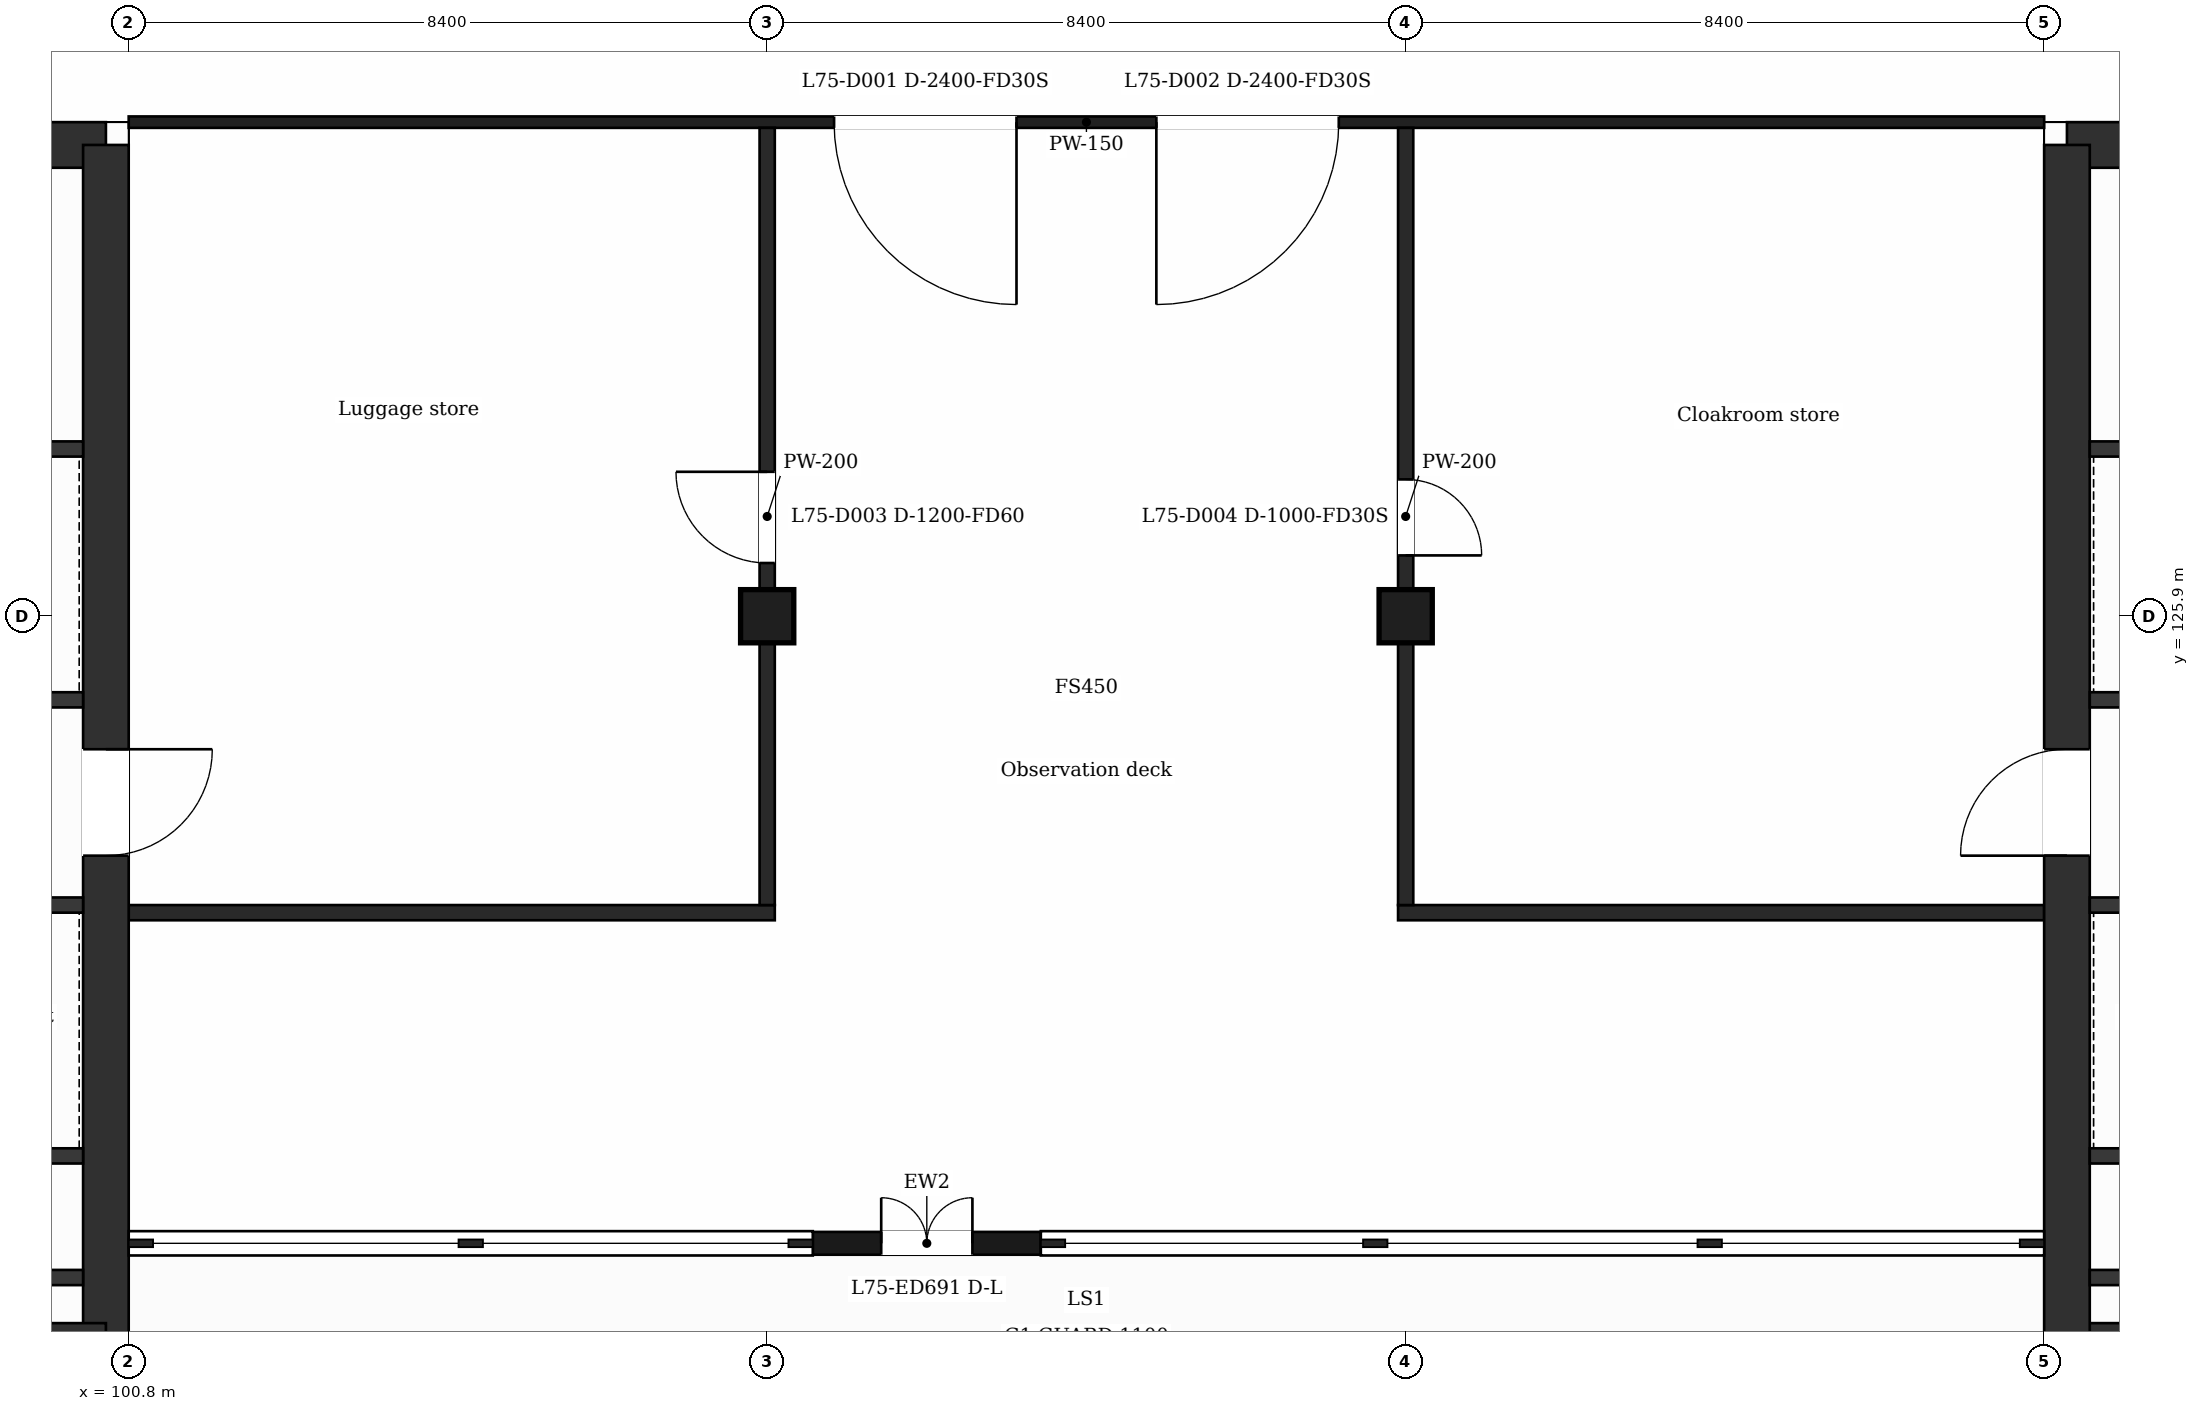
"""IFC4 building model, lengths in metres.
Left out: names, types, materials, properties, quantities, classifications, styles, units other than length and angle.
Written with IfcOpenShell. Run it as: python <this file> out.ifc"""

import sys

from ifc_helpers import new_model, si_unit, direction, frame, frame_2d, origin, origin_2d, place, context, subcontext, project, spatial, rectangle, extrude, element, fill, save


model = new_model("IFC4")
c1 = context("Model", 3, precision=1e-05, world=origin(), true_north=direction((0.0, 1.0)))
c2 = subcontext(c1, "Body", "Model", "MODEL_VIEW")
j1 = project(units=[si_unit("LENGTHUNIT", "METRE"), si_unit("PLANEANGLEUNIT", "RADIAN")], contexts=[c1])
p1 = place(None, origin())
s1 = spatial("IfcSite", under=j1, at=p1, CompositionType="ELEMENT")
p2 = place(p1, origin())
s2 = spatial("IfcBuilding", under=s1, at=p2, CompositionType="ELEMENT")
p3 = place(p2, frame((0.0, 0.0, 307.9)))
s3 = spatial("IfcBuildingStorey", under=s2, at=p3, CompositionType="ELEMENT", Elevation=307.9)
p4 = place(p3, frame((88.893, 132.1, 0.0), z_axis=(0.0, 0.0, 1.0), x_axis=(1.0, 0.0, 0.0)))
e1 = element("IfcWall", 1, at=p4, inside=s3, PredefinedType="SHEAR", context=c2, shape_type="SweptSolid", body=[
    extrude(rectangle(XDim=11.607, YDim=0.6, at=frame_2d((5.803, 0.0))), origin(), (0.0, 0.0, 1.0), 7.5),
])
p5 = place(p4, frame((7.021, 0.0, 0.0)))
e2 = element("IfcOpeningElement", 2, at=p5, cuts=e1, PredefinedType="OPENING", context=c2, shape_type="SweptSolid", body=[
    extrude(rectangle(XDim=1.2, YDim=2.1, at=frame_2d((0.6, 1.05))), frame((0.0, 0.31, 0.0), z_axis=(0.0, -1.0, 0.0), x_axis=(1.0, 0.0, 0.0)), (0.0, 0.0, 1.0), 0.62),
])
p6 = place(p3, frame((100.5, 132.1, 0.0), z_axis=(0.0, 0.0, 1.0), x_axis=(0.0, -1.0, 0.0)))
e3 = element("IfcWall", 3, at=p6, inside=s3, PredefinedType="SHEAR", context=c2, shape_type="SweptSolid", body=[
    extrude(rectangle(XDim=15.8, YDim=0.6, at=frame_2d((7.9, 0.0))), origin(), (0.0, 0.0, 1.0), 7.5),
])
p7 = place(p6, frame((7.95, 0.0, 0.0)))
e4 = element("IfcOpeningElement", 4, at=p7, cuts=e3, PredefinedType="OPENING", context=c2, shape_type="SweptSolid", body=[
    extrude(rectangle(XDim=1.4, YDim=2.1, at=frame_2d((0.7, 1.05))), frame((0.0, 0.31, 0.0), z_axis=(0.0, -1.0, 0.0), x_axis=(1.0, 0.0, 0.0)), (0.0, 0.0, 1.0), 0.62),
])
p8 = place(p3, frame((100.5, 116.3, 0.0), z_axis=(0.0, 0.0, 1.0), x_axis=(-1.0, 0.0, 0.0)))
e5 = element("IfcWall", 5, at=p8, inside=s3, PredefinedType="SHEAR", context=c2, shape_type="SweptSolid", body=[
    extrude(rectangle(XDim=13.734, YDim=0.6, at=frame_2d((6.867, 0.0))), origin(), (0.0, 0.0, 1.0), 7.5),
])
p9 = place(p3, frame((126.3, 132.1, 0.0), z_axis=(0.0, 0.0, 1.0), x_axis=(1.0, 0.0, 0.0)))
e6 = element("IfcWall", 6, at=p9, inside=s3, PredefinedType="SHEAR", context=c2, shape_type="SweptSolid", body=[
    extrude(rectangle(XDim=11.607, YDim=0.6, at=frame_2d((5.803, 0.0))), origin(), (0.0, 0.0, 1.0), 7.5),
])
p10 = place(p9, frame((3.386, 0.0, 0.0)))
e7 = element("IfcOpeningElement", 7, at=p10, cuts=e6, PredefinedType="OPENING", context=c2, shape_type="SweptSolid", body=[
    extrude(rectangle(XDim=1.2, YDim=2.1, at=frame_2d((0.6, 1.05))), frame((0.0, 0.31, 0.0), z_axis=(0.0, -1.0, 0.0), x_axis=(1.0, 0.0, 0.0)), (0.0, 0.0, 1.0), 0.62),
])
p11 = place(p3, frame((140.034, 116.3, 0.0), z_axis=(0.0, 0.0, 1.0), x_axis=(-1.0, 0.0, 0.0)))
e8 = element("IfcWall", 8, at=p11, inside=s3, PredefinedType="SHEAR", context=c2, shape_type="SweptSolid", body=[
    extrude(rectangle(XDim=13.734, YDim=0.6, at=frame_2d((6.867, 0.0))), origin(), (0.0, 0.0, 1.0), 7.5),
])
p12 = place(p3, frame((126.3, 116.3, 0.0), z_axis=(0.0, 0.0, 1.0), x_axis=(0.0, 1.0, 0.0)))
e9 = element("IfcWall", 9, at=p12, inside=s3, PredefinedType="SHEAR", context=c2, shape_type="SweptSolid", body=[
    extrude(rectangle(XDim=15.8, YDim=0.6, at=frame_2d((7.9, 0.0))), origin(), (0.0, 0.0, 1.0), 7.5),
])
p13 = place(p12, frame((6.45, 0.0, 0.0)))
e10 = element("IfcOpeningElement", 10, at=p13, cuts=e9, PredefinedType="OPENING", context=c2, shape_type="SweptSolid", body=[
    extrude(rectangle(XDim=1.4, YDim=2.1, at=frame_2d((0.7, 1.05))), frame((0.0, 0.31, 0.0), z_axis=(0.0, -1.0, 0.0), x_axis=(1.0, 0.0, 0.0)), (0.0, 0.0, 1.0), 0.62),
])
for number, where, z_axis, x_axis in (
    (11, (109.2, 125.9, 0.0), (0.0, 0.0, 1.0), (1.0, 0.0, 0.0)),
    (12, (117.6, 125.9, 0.0), (0.0, 0.0, 1.0), (1.0, 0.0, 0.0)),
):
    element("IfcColumn", number, at=place(p3, frame(where, z_axis=z_axis, x_axis=x_axis)), inside=s3, PredefinedType="COLUMN", context=c2, shape_type="SweptSolid", body=[
        extrude(rectangle(XDim=0.7, YDim=0.7, at=origin_2d()), origin(), (0.0, 0.0, 1.0), 7.5),
    ])
p14 = place(p3, frame((109.8, 117.65, 0.0), z_axis=(0.0, 0.0, 1.0), x_axis=(1.0, 0.0, 0.0)))
e13 = element("IfcWall", 13, at=p14, inside=s3, PredefinedType="SOLIDWALL", context=c2, shape_type="SweptSolid", body=[
    extrude(rectangle(XDim=3.0, YDim=0.3, at=frame_2d((1.5, 0.0))), origin(), (0.0, 0.0, 1.0), 7.05),
])
p15 = place(p14, frame((0.9, 0.0, 0.0)))
e14 = element("IfcOpeningElement", 14, at=p15, cuts=e13, PredefinedType="OPENING", context=c2, shape_type="SweptSolid", body=[
    extrude(rectangle(XDim=1.2, YDim=2.4, at=frame_2d((0.6, 1.2))), frame((0.0, 0.16, 0.0), z_axis=(0.0, -1.0, 0.0), x_axis=(1.0, 0.0, 0.0)), (0.0, 0.0, 1.0), 0.32),
])
for number, where, z_axis, x_axis in (
    (15, (95.227, 117.2, 0.0), (0.0, 0.0, 1.0), (1.0, 0.0, 0.0)),
    (16, (126.6, 117.2, 0.0), (0.0, 0.0, 1.0), (1.0, 0.0, 0.0)),
    (17, (95.227, 118.8, 0.0), (0.0, 0.0, 1.0), (1.0, 0.0, 0.0)),
    (18, (126.6, 118.8, 0.0), (0.0, 0.0, 1.0), (1.0, 0.0, 0.0)),
):
    element("IfcWall", number, at=place(p3, frame(where, z_axis=z_axis, x_axis=x_axis)), inside=s3, PredefinedType="PARTITIONING", context=c2, shape_type="SweptSolid", body=[
        extrude(rectangle(XDim=4.973, YDim=0.2, at=frame_2d((2.486, 0.0))), origin(), (0.0, 0.0, 1.0), 7.05),
    ])
for number, where, z_axis, x_axis in (
    (19, (100.8, 122.0, 0.0), (0.0, 0.0, 1.0), (1.0, 0.0, 0.0)),
    (20, (117.5, 122.0, 0.0), (0.0, 0.0, 1.0), (1.0, 0.0, 0.0)),
):
    element("IfcWall", number, at=place(p3, frame(where, z_axis=z_axis, x_axis=x_axis)), inside=s3, PredefinedType="PARTITIONING", context=c2, shape_type="SweptSolid", body=[
        extrude(rectangle(XDim=8.5, YDim=0.2, at=frame_2d((4.25, 0.0))), origin(), (0.0, 0.0, 1.0), 7.05),
    ])
p16 = place(p3, frame((95.227, 122.1, 0.0), z_axis=(0.0, 0.0, 1.0), x_axis=(1.0, 0.0, 0.0)))
e21 = element("IfcWall", 21, at=p16, inside=s3, PredefinedType="PARTITIONING", context=c2, shape_type="SweptSolid", body=[
    extrude(rectangle(XDim=4.973, YDim=0.2, at=frame_2d((2.486, 0.0))), origin(), (0.0, 0.0, 1.0), 7.05),
])
p17 = place(p16, frame((0.693, 0.0, 0.0)))
e22 = element("IfcOpeningElement", 22, at=p17, cuts=e21, PredefinedType="OPENING", context=c2, shape_type="SweptSolid", body=[
    extrude(rectangle(XDim=1.1, YDim=2.1, at=frame_2d((0.55, 1.05))), frame((0.0, 0.11, 0.0), z_axis=(0.0, -1.0, 0.0), x_axis=(1.0, 0.0, 0.0)), (0.0, 0.0, 1.0), 0.22),
])
p18 = place(p16, frame((3.18, 0.0, 0.0)))
e23 = element("IfcOpeningElement", 23, at=p18, cuts=e21, PredefinedType="OPENING", context=c2, shape_type="SweptSolid", body=[
    extrude(rectangle(XDim=1.1, YDim=2.1, at=frame_2d((0.55, 1.05))), frame((0.0, 0.11, 0.0), z_axis=(0.0, -1.0, 0.0), x_axis=(1.0, 0.0, 0.0)), (0.0, 0.0, 1.0), 0.22),
])
p19 = place(p3, frame((126.6, 122.1, 0.0), z_axis=(0.0, 0.0, 1.0), x_axis=(1.0, 0.0, 0.0)))
e24 = element("IfcWall", 24, at=p19, inside=s3, PredefinedType="PARTITIONING", context=c2, shape_type="SweptSolid", body=[
    extrude(rectangle(XDim=4.973, YDim=0.2, at=frame_2d((2.486, 0.0))), origin(), (0.0, 0.0, 1.0), 7.05),
])
p20 = place(p19, frame((3.351, 0.0, 0.0)))
e25 = element("IfcOpeningElement", 25, at=p20, cuts=e24, PredefinedType="OPENING", context=c2, shape_type="SweptSolid", body=[
    extrude(rectangle(XDim=1.1, YDim=2.1, at=frame_2d((0.55, 1.05))), frame((0.0, 0.11, 0.0), z_axis=(0.0, -1.0, 0.0), x_axis=(1.0, 0.0, 0.0)), (0.0, 0.0, 1.0), 0.22),
])
p21 = place(p19, frame((0.522, 0.0, 0.0)))
e26 = element("IfcOpeningElement", 26, at=p21, cuts=e24, PredefinedType="OPENING", context=c2, shape_type="SweptSolid", body=[
    extrude(rectangle(XDim=1.1, YDim=2.1, at=frame_2d((0.55, 1.05))), frame((0.0, 0.11, 0.0), z_axis=(0.0, -1.0, 0.0), x_axis=(1.0, 0.0, 0.0)), (0.0, 0.0, 1.0), 0.22),
])
p22 = place(p3, frame((92.702, 124.8, 0.0), z_axis=(0.0, 0.0, 1.0), x_axis=(1.0, 0.0, 0.0)))
e27 = element("IfcWall", 27, at=p22, inside=s3, PredefinedType="PARTITIONING", context=c2, shape_type="SweptSolid", body=[
    extrude(rectangle(XDim=7.498, YDim=0.2, at=frame_2d((3.749, 0.0))), origin(), (0.0, 0.0, 1.0), 7.05),
])
p23 = place(p22, frame((0.968, 0.0, 0.0)))
e28 = element("IfcOpeningElement", 28, at=p23, cuts=e27, PredefinedType="OPENING", context=c2, shape_type="SweptSolid", body=[
    extrude(rectangle(XDim=1.1, YDim=2.1, at=frame_2d((0.55, 1.05))), frame((0.0, 0.11, 0.0), z_axis=(0.0, -1.0, 0.0), x_axis=(1.0, 0.0, 0.0)), (0.0, 0.0, 1.0), 0.22),
])
p24 = place(p22, frame((5.785, 0.0, 0.0)))
e29 = element("IfcOpeningElement", 29, at=p24, cuts=e27, PredefinedType="OPENING", context=c2, shape_type="SweptSolid", body=[
    extrude(rectangle(XDim=1.1, YDim=2.1, at=frame_2d((0.55, 1.05))), frame((0.0, 0.11, 0.0), z_axis=(0.0, -1.0, 0.0), x_axis=(1.0, 0.0, 0.0)), (0.0, 0.0, 1.0), 0.22),
])
p25 = place(p3, frame((126.6, 124.8, 0.0), z_axis=(0.0, 0.0, 1.0), x_axis=(1.0, 0.0, 0.0)))
e30 = element("IfcWall", 30, at=p25, inside=s3, PredefinedType="PARTITIONING", context=c2, shape_type="SweptSolid", body=[
    extrude(rectangle(XDim=4.915, YDim=0.2, at=frame_2d((2.458, 0.0))), origin(), (0.0, 0.0, 1.0), 7.05),
])
p26 = place(p25, frame((0.843, 0.0, 0.0)))
e31 = element("IfcOpeningElement", 31, at=p26, cuts=e30, PredefinedType="OPENING", context=c2, shape_type="SweptSolid", body=[
    extrude(rectangle(XDim=1.1, YDim=2.1, at=frame_2d((0.55, 1.05))), frame((0.0, 0.11, 0.0), z_axis=(0.0, -1.0, 0.0), x_axis=(1.0, 0.0, 0.0)), (0.0, 0.0, 1.0), 0.22),
])
p27 = place(p3, frame((92.827, 128.1, 0.0), z_axis=(0.0, 0.0, 1.0), x_axis=(1.0, 0.0, 0.0)))
e32 = element("IfcWall", 32, at=p27, inside=s3, PredefinedType="PARTITIONING", context=c2, shape_type="SweptSolid", body=[
    extrude(rectangle(XDim=7.373, YDim=0.2, at=frame_2d((3.687, 0.0))), origin(), (0.0, 0.0, 1.0), 7.05),
])
p28 = place(p27, frame((2.972, 0.0, 0.0)))
e33 = element("IfcOpeningElement", 33, at=p28, cuts=e32, PredefinedType="OPENING", context=c2, shape_type="SweptSolid", body=[
    extrude(rectangle(XDim=1.1, YDim=2.1, at=frame_2d((0.55, 1.05))), frame((0.0, 0.11, 0.0), z_axis=(0.0, -1.0, 0.0), x_axis=(1.0, 0.0, 0.0)), (0.0, 0.0, 1.0), 0.22),
])
p29 = place(p3, frame((126.6, 128.1, 0.0), z_axis=(0.0, 0.0, 1.0), x_axis=(1.0, 0.0, 0.0)))
e34 = element("IfcWall", 34, at=p29, inside=s3, PredefinedType="PARTITIONING", context=c2, shape_type="SweptSolid", body=[
    extrude(rectangle(XDim=4.915, YDim=0.2, at=frame_2d((2.458, 0.0))), origin(), (0.0, 0.0, 1.0), 7.05),
])
p30 = place(p29, frame((2.972, 0.0, 0.0)))
e35 = element("IfcOpeningElement", 35, at=p30, cuts=e34, PredefinedType="OPENING", context=c2, shape_type="SweptSolid", body=[
    extrude(rectangle(XDim=1.1, YDim=2.1, at=frame_2d((0.55, 1.05))), frame((0.0, 0.11, 0.0), z_axis=(0.0, -1.0, 0.0), x_axis=(1.0, 0.0, 0.0)), (0.0, 0.0, 1.0), 0.22),
])
p31 = place(p3, frame((100.8, 132.4, 0.0), z_axis=(0.0, 0.0, 1.0), x_axis=(1.0, 0.0, 0.0)))
e36 = element("IfcWall", 36, at=p31, inside=s3, PredefinedType="PARTITIONING", context=c2, shape_type="SweptSolid", body=[
    extrude(rectangle(XDim=25.2, YDim=0.15, at=frame_2d((12.6, 0.0))), origin(), (0.0, 0.0, 1.0), 7.05),
])
p32 = place(p31, frame((9.28, 0.0, 0.0)))
e37 = element("IfcOpeningElement", 37, at=p32, cuts=e36, PredefinedType="OPENING", context=c2, shape_type="SweptSolid", body=[
    extrude(rectangle(XDim=2.4, YDim=2.1, at=frame_2d((1.2, 1.05))), frame((0.0, 0.085, 0.0), z_axis=(0.0, -1.0, 0.0), x_axis=(1.0, 0.0, 0.0)), (0.0, 0.0, 1.0), 0.17),
])
p33 = place(p31, frame((13.52, 0.0, 0.0)))
e38 = element("IfcOpeningElement", 38, at=p33, cuts=e36, PredefinedType="OPENING", context=c2, shape_type="SweptSolid", body=[
    extrude(rectangle(XDim=2.4, YDim=2.1, at=frame_2d((1.2, 1.05))), frame((0.0, 0.085, 0.0), z_axis=(0.0, -1.0, 0.0), x_axis=(1.0, 0.0, 0.0)), (0.0, 0.0, 1.0), 0.17),
])
p34 = place(p3, frame((109.2, 122.1, 0.0), z_axis=(0.0, 0.0, 1.0), x_axis=(0.0, 1.0, 0.0)))
e39 = element("IfcWall", 39, at=p34, inside=s3, PredefinedType="PARTITIONING", context=c2, shape_type="SweptSolid", body=[
    extrude(rectangle(XDim=10.225, YDim=0.2, at=frame_2d((5.112, 0.0))), origin(), (0.0, 0.0, 1.0), 7.05),
])
p35 = place(p34, frame((4.5, 0.0, 0.0)))
e40 = element("IfcOpeningElement", 40, at=p35, cuts=e39, PredefinedType="OPENING", context=c2, shape_type="SweptSolid", body=[
    extrude(rectangle(XDim=1.2, YDim=2.1, at=frame_2d((0.6, 1.05))), frame((0.0, 0.11, 0.0), z_axis=(0.0, -1.0, 0.0), x_axis=(1.0, 0.0, 0.0)), (0.0, 0.0, 1.0), 0.22),
])
p36 = place(p3, frame((117.6, 122.1, 0.0), z_axis=(0.0, 0.0, 1.0), x_axis=(0.0, 1.0, 0.0)))
e41 = element("IfcWall", 41, at=p36, inside=s3, PredefinedType="PARTITIONING", context=c2, shape_type="SweptSolid", body=[
    extrude(rectangle(XDim=10.225, YDim=0.2, at=frame_2d((5.112, 0.0))), origin(), (0.0, 0.0, 1.0), 7.05),
])
p37 = place(p36, frame((4.6, 0.0, 0.0)))
e42 = element("IfcOpeningElement", 42, at=p37, cuts=e41, PredefinedType="OPENING", context=c2, shape_type="SweptSolid", body=[
    extrude(rectangle(XDim=1.0, YDim=2.1, at=frame_2d((0.5, 1.05))), frame((0.0, 0.11, 0.0), z_axis=(0.0, -1.0, 0.0), x_axis=(1.0, 0.0, 0.0)), (0.0, 0.0, 1.0), 0.22),
])
p38 = place(p15, origin())
e43 = element("IfcDoor", 43, at=p38, inside=s3, OperationType="DOUBLE_DOOR_SINGLE_SWING", PredefinedType="DOOR", context=c2, shape_type="SweptSolid", body=[
    extrude(rectangle(XDim=1.2, YDim=2.4, at=frame_2d((0.6, 1.2))), frame((0.0, 0.025, 0.0), z_axis=(0.0, -1.0, 0.0), x_axis=(1.0, 0.0, 0.0)), (0.0, 0.0, 1.0), 0.05),
])
fill(e14, e43)
p39 = place(p32, origin())
e44 = element("IfcDoor", 44, at=p39, inside=s3, OperationType="SINGLE_SWING_RIGHT", PredefinedType="DOOR", context=c2, shape_type="SweptSolid", body=[
    extrude(rectangle(XDim=2.4, YDim=2.1, at=frame_2d((1.2, 1.05))), frame((0.0, 0.025, 0.0), z_axis=(0.0, -1.0, 0.0), x_axis=(1.0, 0.0, 0.0)), (0.0, 0.0, 1.0), 0.05),
])
fill(e37, e44)
p40 = place(p33, origin())
e45 = element("IfcDoor", 45, at=p40, inside=s3, OperationType="SINGLE_SWING_LEFT", PredefinedType="DOOR", context=c2, shape_type="SweptSolid", body=[
    extrude(rectangle(XDim=2.4, YDim=2.1, at=frame_2d((1.2, 1.05))), frame((0.0, 0.025, 0.0), z_axis=(0.0, -1.0, 0.0), x_axis=(1.0, 0.0, 0.0)), (0.0, 0.0, 1.0), 0.05),
])
fill(e38, e45)
p41 = place(p35, origin())
e46 = element("IfcDoor", 46, at=p41, inside=s3, OperationType="SINGLE_SWING_RIGHT", PredefinedType="DOOR", context=c2, shape_type="SweptSolid", body=[
    extrude(rectangle(XDim=1.2, YDim=2.1, at=frame_2d((0.6, 1.05))), frame((0.0, 0.025, 0.0), z_axis=(0.0, -1.0, 0.0), x_axis=(1.0, 0.0, 0.0)), (0.0, 0.0, 1.0), 0.05),
])
fill(e40, e46)
p42 = place(p37, origin())
e47 = element("IfcDoor", 47, at=p42, inside=s3, OperationType="SINGLE_SWING_LEFT", PredefinedType="DOOR", context=c2, shape_type="SweptSolid", body=[
    extrude(rectangle(XDim=1.0, YDim=2.1, at=frame_2d((0.5, 1.05))), frame((0.0, 0.025, 0.0), z_axis=(0.0, -1.0, 0.0), x_axis=(1.0, 0.0, 0.0)), (0.0, 0.0, 1.0), 0.05),
])
fill(e42, e47)
p43 = place(p7, origin())
e48 = element("IfcDoor", 48, at=p43, inside=s3, OperationType="SINGLE_SWING_LEFT", PredefinedType="DOOR", context=c2, shape_type="SweptSolid", body=[
    extrude(rectangle(XDim=1.4, YDim=2.1, at=frame_2d((0.7, 1.05))), frame((0.0, 0.025, 0.0), z_axis=(0.0, -1.0, 0.0), x_axis=(1.0, 0.0, 0.0)), (0.0, 0.0, 1.0), 0.05),
])
fill(e4, e48)
p44 = place(p13, origin())
e49 = element("IfcDoor", 49, at=p44, inside=s3, OperationType="SINGLE_SWING_LEFT", PredefinedType="DOOR", context=c2, shape_type="SweptSolid", body=[
    extrude(rectangle(XDim=1.4, YDim=2.1, at=frame_2d((0.7, 1.05))), frame((0.0, 0.025, 0.0), z_axis=(0.0, -1.0, 0.0), x_axis=(1.0, 0.0, 0.0)), (0.0, 0.0, 1.0), 0.05),
])
fill(e10, e49)
save(model, sys.argv[1])
